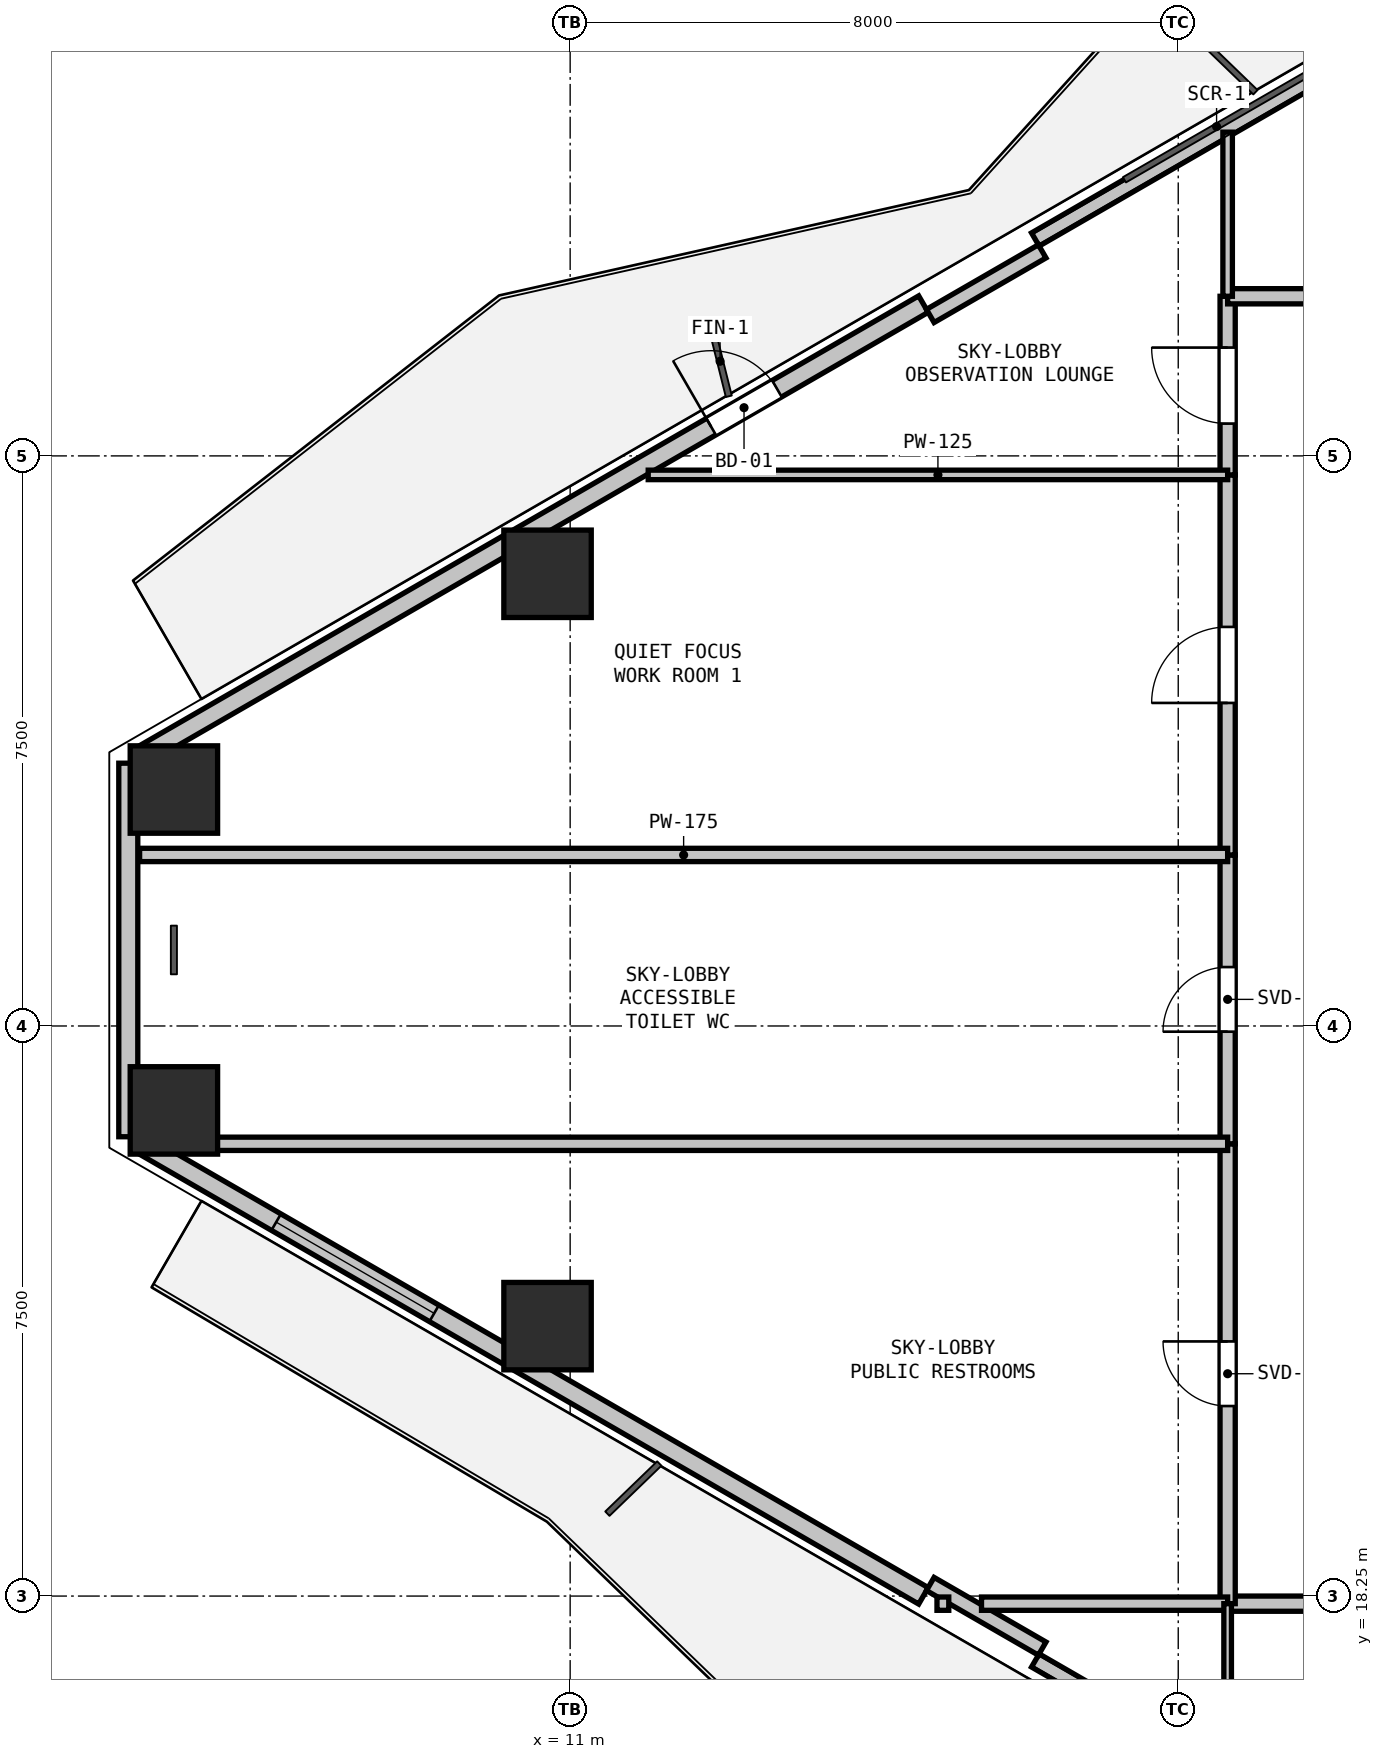
"""IFC4 building model, lengths in metres.
Left out: names, types, materials, properties, quantities, classifications, styles, units other than length and angle.
Written with IfcOpenShell. Run it as: python <this file> out.ifc"""

import sys

from ifc_helpers import new_model, si_unit, direction, frame, frame_2d, origin, origin_2d, place, context, subcontext, project, spatial, rectangle, hollow_rectangle, extrude, element, fill, save


model = new_model("IFC4")
c1 = context("Model", 3, precision=1e-05, world=origin(), true_north=direction((0.0, 1.0)))
c2 = subcontext(c1, "Body", "Model", "MODEL_VIEW")
j1 = project(units=[si_unit("LENGTHUNIT", "METRE"), si_unit("PLANEANGLEUNIT", "RADIAN")], contexts=[c1])
p1 = place(None, origin())
s1 = spatial("IfcSite", under=j1, at=p1, CompositionType="ELEMENT")
p2 = place(p1, origin())
s2 = spatial("IfcBuilding", under=s1, at=p2, CompositionType="ELEMENT")
p3 = place(p2, frame((0.0, 0.0, 116.4)))
s3 = spatial("IfcBuildingStorey", under=s2, at=p3, CompositionType="ELEMENT", Elevation=116.4)
p4 = place(p3, frame((5.787, 28.861, 0.0), z_axis=(0.0, 0.0, 1.0), x_axis=(1.0, 0.0, 0.0)))
e1 = element("IfcColumn", 1, at=p4, inside=s3, PredefinedType="COLUMN", context=c2, shape_type="SweptSolid", body=[
    extrude(hollow_rectangle(XDim=1.15, YDim=1.15, WallThickness=0.032, at=origin_2d()), origin(), (0.0, 0.0, 1.0), 2.96),
])
for number, where, z_axis, x_axis in (
    (2, (10.702, 31.699, 0.0), (0.0, 0.0, 1.0), (1.0, 0.0, 0.0)),
    (3, (10.702, 21.801, 0.0), (0.0, 0.0, 1.0), (1.0, 0.0, 0.0)),
):
    element("IfcColumn", number, at=place(p3, frame(where, z_axis=z_axis, x_axis=x_axis)), inside=s3, PredefinedType="COLUMN", context=c2, shape_type="SweptSolid", body=[
        extrude(hollow_rectangle(XDim=1.15, YDim=1.15, WallThickness=0.032, at=origin_2d()), origin(), (0.0, 0.0, 1.0), 3.21),
    ])
p5 = place(p3, frame((5.787, 24.639, 0.0), z_axis=(0.0, 0.0, 1.0), x_axis=(1.0, 0.0, 0.0)))
e4 = element("IfcColumn", 4, at=p5, inside=s3, PredefinedType="COLUMN", context=c2, shape_type="SweptSolid", body=[
    extrude(hollow_rectangle(XDim=1.15, YDim=1.15, WallThickness=0.032, at=origin_2d()), origin(), (0.0, 0.0, 1.0), 2.96),
])
p6 = place(p3, frame((5.187, 24.293, 0.0), z_axis=(0.0, 0.0, 1.0), x_axis=(0.0, 1.0, 0.0)))
e5 = element("IfcWall", 5, at=p6, inside=s3, PredefinedType="SOLIDWALL", context=c2, shape_type="SweptSolid", body=[
    extrude(rectangle(XDim=4.915, YDim=0.25, at=frame_2d((2.457, 0.0))), origin(), (0.0, 0.0, 1.0), 4.18),
])
p7 = place(p3, frame((5.317, 29.282, 0.0), z_axis=(0.0, 0.0, 1.0), x_axis=(0.866023023012, 0.500004123596, 0.0)))
e6 = element("IfcWall", 6, at=p7, inside=s3, PredefinedType="SOLIDWALL", context=c2, shape_type="SweptSolid", body=[
    extrude(rectangle(XDim=11.93, YDim=0.25, at=frame_2d((5.965, 0.0))), origin(), (0.0, 0.0, 1.0), 2.945),
])
p8 = place(p7, frame((8.704, 0.0, 0.0)))
e7 = element("IfcOpeningElement", 7, at=p8, cuts=e6, PredefinedType="OPENING", context=c2, shape_type="SweptSolid", body=[
    extrude(rectangle(XDim=1.0, YDim=2.1, at=frame_2d((0.5, 1.05))), frame((0.0, 0.135, 0.0), z_axis=(0.0, -1.0, 0.0), x_axis=(1.0, 0.0, 0.0)), (0.0, 0.0, 1.0), 0.27),
])
p9 = place(p3, frame((17.12, 36.097, 0.0), z_axis=(0.0, 0.0, 1.0), x_axis=(0.866027010039, 0.499997217876, 0.0)))
e8 = element("IfcWall", 8, at=p9, inside=s3, PredefinedType="PARAPET", context=c2, shape_type="SweptSolid", body=[
    extrude(rectangle(XDim=11.229, YDim=0.2, at=frame_2d((5.615, 0.0))), origin(), (0.0, 0.0, 1.0), 0.2),
])
p10 = place(p3, frame((15.738, 35.091, 0.0), z_axis=(0.0, 0.0, 1.0), x_axis=(0.866025371046, 0.500000056704, 0.0)))
e9 = element("IfcWall", 9, at=p10, inside=s3, PredefinedType="PARAPET", context=c2, shape_type="SweptSolid", body=[
    extrude(rectangle(XDim=1.7, YDim=0.2, at=frame_2d((0.85, 0.0))), origin(), (0.0, 0.0, 1.0), 4.18),
])
p11 = place(p3, frame((26.845, 11.788, 0.0), z_axis=(0.0, 0.0, 1.0), x_axis=(-0.866027010039, 0.499997217876, 0.0)))
e10 = element("IfcWall", 10, at=p11, inside=s3, PredefinedType="PARAPET", context=c2, shape_type="SweptSolid", body=[
    extrude(rectangle(XDim=11.229, YDim=0.2, at=frame_2d((5.615, 0.0))), origin(), (0.0, 0.0, 1.0), 0.2),
])
p12 = place(p3, frame((15.648, 18.253, 0.0), z_axis=(0.0, 0.0, 1.0), x_axis=(-0.866023023012, 0.500004123596, 0.0)))
e11 = element("IfcWall", 11, at=p12, inside=s3, PredefinedType="SOLIDWALL", context=c2, shape_type="SweptSolid", body=[
    extrude(rectangle(XDim=11.93, YDim=0.25, at=frame_2d((5.965, 0.0))), origin(), (0.0, 0.0, 1.0), 2.945),
])
p13 = place(p12, frame((7.433, 0.0, 0.9)))
e12 = element("IfcOpeningElement", 12, at=p13, cuts=e11, PredefinedType="OPENING", context=c2, shape_type="SweptSolid", body=[
    extrude(rectangle(XDim=2.4, YDim=1.96, at=frame_2d((1.2, 0.98))), frame((0.0, 0.135, 0.0), z_axis=(0.0, -1.0, 0.0), x_axis=(1.0, 0.0, 0.0)), (0.0, 0.0, 1.0), 0.27),
])
p14 = place(p3, frame((17.21, 17.559, 0.0), z_axis=(0.0, 0.0, 1.0), x_axis=(-0.866025371046, 0.500000056704, 0.0)))
e13 = element("IfcWall", 13, at=p14, inside=s3, PredefinedType="PARAPET", context=c2, shape_type="SweptSolid", body=[
    extrude(rectangle(XDim=1.7, YDim=0.2, at=frame_2d((0.85, 0.0))), origin(), (0.0, 0.0, 1.0), 4.18),
])
p15 = place(p3, frame((28.5, 18.15, 0.0), z_axis=(0.0, 0.0, 1.0), x_axis=(-1.0, 0.0, 0.0)))
e14 = element("IfcWall", 14, at=p15, inside=s3, PredefinedType="PARTITIONING", context=c2, shape_type="SweptSolid", body=[
    extrude(rectangle(XDim=8.85, YDim=0.2, at=frame_2d((4.425, 0.0))), origin(), (0.0, 0.0, 1.0), 4.56),
])
p16 = place(p15, frame((3.525, 0.0, 0.0)))
e15 = element("IfcOpeningElement", 15, at=p16, cuts=e14, PredefinedType="OPENING", context=c2, shape_type="SweptSolid", body=[
    extrude(rectangle(XDim=1.8, YDim=2.2, at=frame_2d((0.9, 1.1))), frame((0.0, 0.11, 0.0), z_axis=(0.0, -1.0, 0.0), x_axis=(1.0, 0.0, 0.0)), (0.0, 0.0, 1.0), 0.22),
])
p17 = place(p3, frame((19.65, 18.15, 0.0), z_axis=(0.0, 0.0, 1.0), x_axis=(0.0, 1.0, 0.0)))
e16 = element("IfcWall", 16, at=p17, inside=s3, PredefinedType="PARTITIONING", context=c2, shape_type="SweptSolid", body=[
    extrude(rectangle(XDim=6.05, YDim=0.2, at=frame_2d((3.025, 0.0))), origin(), (0.0, 0.0, 1.0), 2.945),
])
p18 = place(p17, frame((2.6, 0.0, 0.0)))
e17 = element("IfcOpeningElement", 17, at=p18, cuts=e16, PredefinedType="OPENING", context=c2, shape_type="SweptSolid", body=[
    extrude(rectangle(XDim=0.85, YDim=2.1, at=frame_2d((0.425, 1.05))), frame((0.0, 0.11, 0.0), z_axis=(0.0, -1.0, 0.0), x_axis=(1.0, 0.0, 0.0)), (0.0, 0.0, 1.0), 0.22),
])
p19 = place(p3, frame((19.65, 24.2, 0.0), z_axis=(0.0, 0.0, 1.0), x_axis=(0.0, 1.0, 0.0)))
e18 = element("IfcWall", 18, at=p19, inside=s3, PredefinedType="PARTITIONING", context=c2, shape_type="SweptSolid", body=[
    extrude(rectangle(XDim=3.8, YDim=0.2, at=frame_2d((1.9, 0.0))), origin(), (0.0, 0.0, 1.0), 2.945),
])
p20 = place(p19, frame((1.475, 0.0, 0.0)))
e19 = element("IfcOpeningElement", 19, at=p20, cuts=e18, PredefinedType="OPENING", context=c2, shape_type="SweptSolid", body=[
    extrude(rectangle(XDim=0.85, YDim=2.1, at=frame_2d((0.425, 1.05))), frame((0.0, 0.11, 0.0), z_axis=(0.0, -1.0, 0.0), x_axis=(1.0, 0.0, 0.0)), (0.0, 0.0, 1.0), 0.22),
])
p21 = place(p3, frame((19.65, 28.0, 0.0), z_axis=(0.0, 0.0, 1.0), x_axis=(0.0, 1.0, 0.0)))
e20 = element("IfcWall", 20, at=p21, inside=s3, PredefinedType="PARTITIONING", context=c2, shape_type="SweptSolid", body=[
    extrude(rectangle(XDim=5.0, YDim=0.2, at=frame_2d((2.5, 0.0))), origin(), (0.0, 0.0, 1.0), 4.56),
])
p22 = place(p21, frame((2.0, 0.0, 0.0)))
e21 = element("IfcOpeningElement", 21, at=p22, cuts=e20, PredefinedType="OPENING", context=c2, shape_type="SweptSolid", body=[
    extrude(rectangle(XDim=1.0, YDim=2.15, at=frame_2d((0.5, 1.075))), frame((0.0, 0.11, 0.0), z_axis=(0.0, -1.0, 0.0), x_axis=(1.0, 0.0, 0.0)), (0.0, 0.0, 1.0), 0.22),
])
p23 = place(p3, frame((19.65, 33.0, 0.0), z_axis=(0.0, 0.0, 1.0), x_axis=(0.0, 1.0, 0.0)))
e22 = element("IfcWall", 22, at=p23, inside=s3, PredefinedType="PARTITIONING", context=c2, shape_type="SweptSolid", body=[
    extrude(rectangle(XDim=2.35, YDim=0.2, at=frame_2d((1.175, 0.0))), origin(), (0.0, 0.0, 1.0), 4.56),
])
p24 = place(p23, frame((0.675, 0.0, 0.0)))
e23 = element("IfcOpeningElement", 23, at=p24, cuts=e22, PredefinedType="OPENING", context=c2, shape_type="SweptSolid", body=[
    extrude(rectangle(XDim=1.0, YDim=2.15, at=frame_2d((0.5, 1.075))), frame((0.0, 0.11, 0.0), z_axis=(0.0, -1.0, 0.0), x_axis=(1.0, 0.0, 0.0)), (0.0, 0.0, 1.0), 0.22),
])
p25 = place(p3, frame((19.65, 35.35, 0.0), z_axis=(0.0, 0.0, 1.0), x_axis=(1.0, 0.0, 0.0)))
e24 = element("IfcWall", 24, at=p25, inside=s3, PredefinedType="PARTITIONING", context=c2, shape_type="SweptSolid", body=[
    extrude(rectangle(XDim=11.35, YDim=0.2, at=frame_2d((5.675, 0.0))), origin(), (0.0, 0.0, 1.0), 3.195),
])
p26 = place(p25, frame((5.175, 0.0, 0.0)))
e25 = element("IfcOpeningElement", 25, at=p26, cuts=e24, PredefinedType="OPENING", context=c2, shape_type="SweptSolid", body=[
    extrude(rectangle(XDim=1.0, YDim=2.15, at=frame_2d((0.5, 1.075))), frame((0.0, 0.11, 0.0), z_axis=(0.0, -1.0, 0.0), x_axis=(1.0, 0.0, 0.0)), (0.0, 0.0, 1.0), 0.22),
])
p27 = place(p3, frame((19.65, 18.15, 0.0), z_axis=(0.0, 0.0, 1.0), x_axis=(-1.0, 0.0, 0.0)))
e26 = element("IfcWall", 26, at=p27, inside=s3, PredefinedType="PLUMBINGWALL", context=c2, shape_type="SweptSolid", body=[
    extrude(rectangle(XDim=3.238, YDim=0.175, at=frame_2d((1.619, 0.0))), origin(), (0.0, 0.0, 1.0), 2.365),
])
p28 = place(p3, frame((15.981, 18.15, 0.0), z_axis=(0.0, 0.0, 1.0), x_axis=(-1.0, 0.0, 0.0)))
e27 = element("IfcWall", 27, at=p28, inside=s3, PredefinedType="PLUMBINGWALL", context=c2, shape_type="SweptSolid", body=[
    extrude(rectangle(XDim=0.155, YDim=0.175, at=frame_2d((0.078, 0.0))), origin(), (0.0, 0.0, 1.0), 4.56),
])
p29 = place(p3, frame((5.618, 24.2, 0.0), z_axis=(0.0, 0.0, 1.0), x_axis=(1.0, 0.0, 0.0)))
e28 = element("IfcWall", 28, at=p29, inside=s3, PredefinedType="PLUMBINGWALL", context=c2, shape_type="SweptSolid", body=[
    extrude(rectangle(XDim=14.031, YDim=0.175, at=frame_2d((7.016, 0.0))), origin(), (0.0, 0.0, 1.0), 2.945),
])
p30 = place(p3, frame((5.336, 28.0, 0.0), z_axis=(0.0, 0.0, 1.0), x_axis=(1.0, 0.0, 0.0)))
e29 = element("IfcWall", 29, at=p30, inside=s3, PredefinedType="PLUMBINGWALL", context=c2, shape_type="SweptSolid", body=[
    extrude(rectangle(XDim=14.314, YDim=0.175, at=frame_2d((7.157, 0.0))), origin(), (0.0, 0.0, 1.0), 2.945),
])
p31 = place(p3, frame((19.65, 35.35, 0.0), z_axis=(0.0, 0.0, 1.0), x_axis=(0.0, 1.0, 0.0)))
e30 = element("IfcWall", 30, at=p31, inside=s3, PredefinedType="PARTITIONING", context=c2, shape_type="SweptSolid", body=[
    extrude(rectangle(XDim=2.159, YDim=0.125, at=frame_2d((1.08, 0.0))), origin(), (0.0, 0.0, 1.0), 2.365),
])
p32 = place(p3, frame((19.65, 15.991, 0.0), z_axis=(0.0, 0.0, 1.0), x_axis=(0.0, 1.0, 0.0)))
e31 = element("IfcWall", 31, at=p32, inside=s3, PredefinedType="PARTITIONING", context=c2, shape_type="SweptSolid", body=[
    extrude(rectangle(XDim=2.159, YDim=0.1, at=frame_2d((1.08, 0.0))), origin(), (0.0, 0.0, 1.0), 2.365),
])
p33 = place(p3, frame((12.027, 33.0, 0.0), z_axis=(0.0, 0.0, 1.0), x_axis=(1.0, 0.0, 0.0)))
e32 = element("IfcWall", 32, at=p33, inside=s3, PredefinedType="PARTITIONING", context=c2, shape_type="SweptSolid", body=[
    extrude(rectangle(XDim=7.623, YDim=0.125, at=frame_2d((3.812, 0.0))), origin(), (0.0, 0.0, 1.0), 2.365),
])
p34 = place(p8, origin())
e33 = element("IfcDoor", 33, at=p34, inside=s3, OperationType="SINGLE_SWING_LEFT", PredefinedType="DOOR", context=c2, shape_type="SweptSolid", body=[
    extrude(rectangle(XDim=1.0, YDim=2.1, at=frame_2d((0.5, 1.05))), frame((0.0, 0.025, 0.0), z_axis=(0.0, -1.0, 0.0), x_axis=(1.0, 0.0, 0.0)), (0.0, 0.0, 1.0), 0.05),
])
fill(e7, e33)
p35 = place(p13, origin())
e34 = element("IfcWindow", 34, at=p35, inside=s3, PartitioningType="SINGLE_PANEL", PredefinedType="WINDOW", context=c2, shape_type="SweptSolid", body=[
    extrude(rectangle(XDim=2.4, YDim=1.96, at=frame_2d((1.2, 0.98))), frame((0.0, 0.03, 0.0), z_axis=(0.0, -1.0, 0.0), x_axis=(1.0, 0.0, 0.0)), (0.0, 0.0, 1.0), 0.06),
])
fill(e12, e34)
p36 = place(p18, origin())
e35 = element("IfcDoor", 35, at=p36, inside=s3, OperationType="SINGLE_SWING_RIGHT", PredefinedType="DOOR", context=c2, shape_type="SweptSolid", body=[
    extrude(rectangle(XDim=0.85, YDim=2.1, at=frame_2d((0.425, 1.05))), frame((0.0, 0.025, 0.0), z_axis=(0.0, -1.0, 0.0), x_axis=(1.0, 0.0, 0.0)), (0.0, 0.0, 1.0), 0.05),
])
fill(e17, e35)
p37 = place(p20, origin())
e36 = element("IfcDoor", 36, at=p37, inside=s3, OperationType="SINGLE_SWING_LEFT", PredefinedType="DOOR", context=c2, shape_type="SweptSolid", body=[
    extrude(rectangle(XDim=0.85, YDim=2.1, at=frame_2d((0.425, 1.05))), frame((0.0, 0.025, 0.0), z_axis=(0.0, -1.0, 0.0), x_axis=(1.0, 0.0, 0.0)), (0.0, 0.0, 1.0), 0.05),
])
fill(e19, e36)
p38 = place(p22, origin())
e37 = element("IfcDoor", 37, at=p38, inside=s3, OperationType="SINGLE_SWING_LEFT", PredefinedType="DOOR", context=c2, shape_type="SweptSolid", body=[
    extrude(rectangle(XDim=1.0, YDim=2.15, at=frame_2d((0.5, 1.075))), frame((0.0, 0.025, 0.0), z_axis=(0.0, -1.0, 0.0), x_axis=(1.0, 0.0, 0.0)), (0.0, 0.0, 1.0), 0.05),
])
fill(e21, e37)
p39 = place(p24, origin())
e38 = element("IfcDoor", 38, at=p39, inside=s3, OperationType="SINGLE_SWING_RIGHT", PredefinedType="DOOR", context=c2, shape_type="SweptSolid", body=[
    extrude(rectangle(XDim=1.0, YDim=2.15, at=frame_2d((0.5, 1.075))), frame((0.0, 0.025, 0.0), z_axis=(0.0, -1.0, 0.0), x_axis=(1.0, 0.0, 0.0)), (0.0, 0.0, 1.0), 0.05),
])
fill(e23, e38)
save(model, sys.argv[1])
